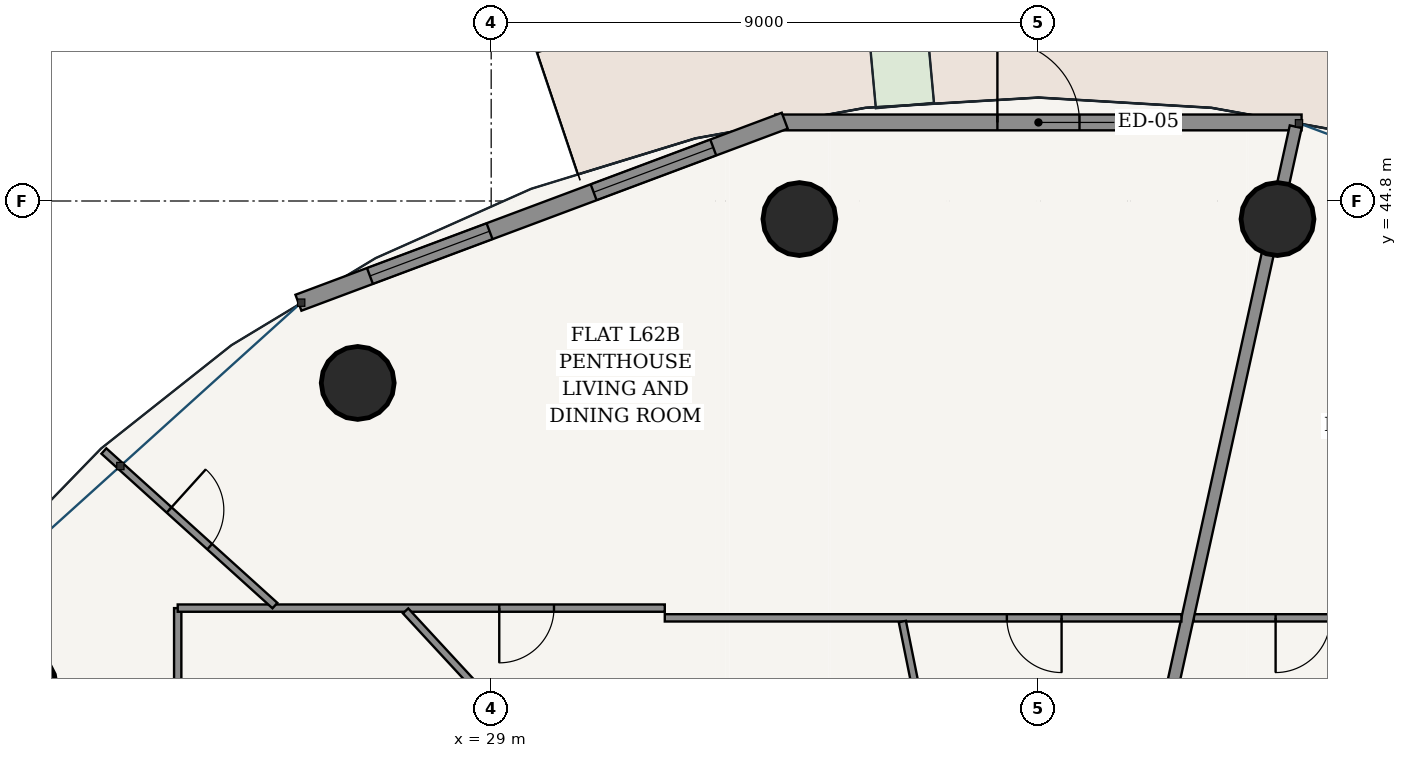
"""IFC4 building model, lengths in metres.
Left out: names, types, materials, properties, quantities, classifications, styles, units other than length and angle.
Written with IfcOpenShell. Run it as: python <this file> out.ifc"""

import sys

from ifc_helpers import new_model, si_unit, direction, frame, frame_2d, origin, origin_2d, place, context, subcontext, project, spatial, rectangle, hollow_circle, extrude, source, transform, mapped, element, fill, save


model = new_model("IFC4")
c1 = context("Model", 3, precision=1e-05, world=origin(), true_north=direction((-0.2419218956, 0.970295726276)))
c2 = subcontext(c1, "Body", "Model", "MODEL_VIEW")
j1 = project(units=[si_unit("LENGTHUNIT", "METRE"), si_unit("PLANEANGLEUNIT", "RADIAN")], contexts=[c1])
p1 = place(None, origin())
s1 = spatial("IfcSite", under=j1, at=p1, CompositionType="ELEMENT")
p2 = place(p1, origin())
s2 = spatial("IfcBuilding", under=s1, at=p2, CompositionType="ELEMENT")
p3 = place(p2, frame((0.0, 0.0, 235.6)))
s3 = spatial("IfcBuildingStorey", under=s2, at=p3, CompositionType="ELEMENT", Elevation=235.6)
for number, where, z_axis, x_axis in (
    (1, (41.931, 44.503, 0.0), (0.0, 0.0, 1.0), (1.0, 0.0, 0.0)),
    (2, (34.069, 44.503, 0.0), (0.0, 0.0, 1.0), (1.0, 0.0, 0.0)),
    (3, (26.805, 41.808, 0.0), (0.0, 0.0, 1.0), (1.0, 0.0, 0.0)),
    (4, (21.246, 36.828, 0.0), (0.0, 0.0, 1.0), (1.0, 0.0, 0.0)),
):
    element("IfcColumn", number, at=place(p3, frame(where, z_axis=z_axis, x_axis=x_axis)), inside=s3, PredefinedType="COLUMN", context=c2, shape_type="SweptSolid", body=[
        extrude(hollow_circle(Radius=0.6, WallThickness=0.038, at=origin_2d()), origin(), (0.0, 0.0, 1.0), 3.7),
    ])
p4 = place(p3, frame((42.327, 46.092, 0.0), z_axis=(0.0, 0.0, 1.0), x_axis=(-1.0, 0.0, 0.0)))
e5 = element("IfcWall", 5, at=p4, inside=s3, PredefinedType="SOLIDWALL", context=c2, shape_type="SweptSolid", body=[
    extrude(rectangle(XDim=8.654, YDim=0.26, at=frame_2d((4.327, 0.0))), origin(), (0.0, 0.0, 1.0), 3.435),
])
p5 = place(p4, frame((3.652, 0.0, 0.0)))
e6 = element("IfcOpeningElement", 6, at=p5, cuts=e5, PredefinedType="OPENING", context=c2, shape_type="SweptSolid", body=[
    extrude(rectangle(XDim=1.35, YDim=2.2, at=frame_2d((0.675, 1.1))), frame((0.0, 0.14, 0.0), z_axis=(0.0, -1.0, 0.0), x_axis=(1.0, 0.0, 0.0)), (0.0, 0.0, 1.0), 0.28),
])
p6 = place(p3, frame((33.828, 46.12, 0.0), z_axis=(0.0, 0.0, 1.0), x_axis=(-0.936556918375, -0.350515532672, 0.0)))
e7 = element("IfcWall", 7, at=p6, inside=s3, PredefinedType="SOLIDWALL", context=c2, shape_type="SweptSolid", body=[
    extrude(rectangle(XDim=8.539, YDim=0.28, at=frame_2d((4.27, 0.0))), origin(), (0.0, 0.0, 1.0), 3.435),
])
p7 = place(p6, frame((1.256, 0.0, 0.85)))
e8 = element("IfcOpeningElement", 8, at=p7, cuts=e7, PredefinedType="OPENING", context=c2, shape_type="SweptSolid", body=[
    extrude(rectangle(XDim=2.1, YDim=1.95, at=frame_2d((1.05, 0.975))), frame((0.0, 0.15, 0.0), z_axis=(0.0, -1.0, 0.0), x_axis=(1.0, 0.0, 0.0)), (0.0, 0.0, 1.0), 0.3),
])
p8 = place(p6, frame((5.184, 0.0, 0.85)))
e9 = element("IfcOpeningElement", 9, at=p8, cuts=e7, PredefinedType="OPENING", context=c2, shape_type="SweptSolid", body=[
    extrude(rectangle(XDim=2.1, YDim=1.95, at=frame_2d((1.05, 0.975))), frame((0.0, 0.15, 0.0), z_axis=(0.0, -1.0, 0.0), x_axis=(1.0, 0.0, 0.0)), (0.0, 0.0, 1.0), 0.3),
])
p9 = place(p3, frame((40.555, 37.945, 0.0), z_axis=(0.0, 0.0, 1.0), x_axis=(1.0, 0.0, 0.0)))
e10 = element("IfcWall", 10, at=p9, inside=s3, PredefinedType="PARTITIONING", context=c2, shape_type="SweptSolid", body=[
    extrude(rectangle(XDim=3.59, YDim=0.12, at=frame_2d((1.795, 0.0))), origin(), (0.0, 0.0, 1.0), 2.951),
])
p10 = place(p9, frame((1.345, 0.0, 0.0)))
e11 = element("IfcOpeningElement", 11, at=p10, cuts=e10, PredefinedType="OPENING", context=c2, shape_type="SweptSolid", body=[
    extrude(rectangle(XDim=0.9, YDim=2.15, at=frame_2d((0.45, 1.075))), frame((0.0, 0.07, 0.0), z_axis=(0.0, -1.0, 0.0), x_axis=(1.0, 0.0, 0.0)), (0.0, 0.0, 1.0), 0.14),
])
p11 = place(p3, frame((39.811, 35.027, 0.0), z_axis=(0.0, 0.0, 1.0), x_axis=(0.214966857327, 0.976621344356, 0.0)))
e12 = element("IfcWall", 12, at=p11, inside=s3, PredefinedType="PARTITIONING", context=c2, shape_type="SweptSolid", body=[
    extrude(rectangle(XDim=11.258, YDim=0.2, at=frame_2d((5.629, 0.0))), origin(), (0.0, 0.0, 1.0), 2.52),
])
p12 = place(p3, frame((23.845, 26.902, 0.0), z_axis=(0.0, 0.0, 1.0), x_axis=(0.0, 1.0, 0.0)))
e13 = element("IfcWall", 13, at=p12, inside=s3, PredefinedType="PARTITIONING", context=c2, shape_type="SweptSolid", body=[
    extrude(rectangle(XDim=11.203, YDim=0.12, at=frame_2d((5.602, 0.0))), origin(), (0.0, 0.0, 1.0), 2.951),
])
p13 = place(p12, frame((2.276, 0.0, 0.0)))
e14 = element("IfcOpeningElement", 14, at=p13, cuts=e13, PredefinedType="OPENING", context=c2, shape_type="SweptSolid", body=[
    extrude(rectangle(XDim=0.9, YDim=2.15, at=frame_2d((0.45, 1.075))), frame((0.0, 0.07, 0.0), z_axis=(0.0, -1.0, 0.0), x_axis=(1.0, 0.0, 0.0)), (0.0, 0.0, 1.0), 0.14),
])
p14 = place(p3, frame((23.845, 38.105, 0.0), z_axis=(0.0, 0.0, 1.0), x_axis=(1.0, 0.0, 0.0)))
e15 = element("IfcWall", 15, at=p14, inside=s3, PredefinedType="PARTITIONING", context=c2, shape_type="SweptSolid", body=[
    extrude(rectangle(XDim=8.01, YDim=0.12, at=frame_2d((4.005, 0.0))), origin(), (0.0, 0.0, 1.0), 2.951),
])
p15 = place(p14, frame((5.288, 0.0, 0.0)))
e16 = element("IfcOpeningElement", 16, at=p15, cuts=e15, PredefinedType="OPENING", context=c2, shape_type="SweptSolid", body=[
    extrude(rectangle(XDim=0.9, YDim=2.15, at=frame_2d((0.45, 1.075))), frame((0.0, 0.07, 0.0), z_axis=(0.0, -1.0, 0.0), x_axis=(1.0, 0.0, 0.0)), (0.0, 0.0, 1.0), 0.14),
])
p16 = place(p3, frame((31.855, 37.945, 0.0), z_axis=(0.0, 0.0, 1.0), x_axis=(1.0, 0.0, 0.0)))
e17 = element("IfcWall", 17, at=p16, inside=s3, PredefinedType="PARTITIONING", context=c2, shape_type="SweptSolid", body=[
    extrude(rectangle(XDim=8.496, YDim=0.12, at=frame_2d((4.248, 0.0))), origin(), (0.0, 0.0, 1.0), 2.951),
])
p17 = place(p16, frame((5.625, 0.0, 0.0)))
e18 = element("IfcOpeningElement", 18, at=p17, cuts=e17, PredefinedType="OPENING", context=c2, shape_type="SweptSolid", body=[
    extrude(rectangle(XDim=0.9, YDim=2.15, at=frame_2d((0.45, 1.075))), frame((0.0, 0.07, 0.0), z_axis=(0.0, -1.0, 0.0), x_axis=(1.0, 0.0, 0.0)), (0.0, 0.0, 1.0), 0.14),
])
p18 = place(p3, frame((25.444, 38.146, 0.0), z_axis=(0.0, 0.0, 1.0), x_axis=(-0.741941434687, 0.670464695189, 0.0)))
e19 = element("IfcWall", 19, at=p18, inside=s3, PredefinedType="PARTITIONING", context=c2, shape_type="SweptSolid", body=[
    extrude(rectangle(XDim=3.792, YDim=0.12, at=frame_2d((1.896, 0.0))), origin(), (0.0, 0.0, 1.0), 2.951),
])
p19 = place(p18, frame((1.446, 0.0, 0.0)))
e20 = element("IfcOpeningElement", 20, at=p19, cuts=e19, PredefinedType="OPENING", context=c2, shape_type="SweptSolid", body=[
    extrude(rectangle(XDim=0.9, YDim=2.15, at=frame_2d((0.45, 1.075))), frame((0.0, 0.07, 0.0), z_axis=(0.0, -1.0, 0.0), x_axis=(1.0, 0.0, 0.0)), (0.0, 0.0, 1.0), 0.14),
])
p20 = place(p3, frame((36.339, 35.027, 0.0), z_axis=(0.0, 0.0, 1.0), x_axis=(-0.197903570547, 0.980221493727, 0.0)))
e21 = element("IfcWall", 21, at=p20, inside=s3, PredefinedType="PARTITIONING", context=c2, shape_type="SweptSolid", body=[
    extrude(rectangle(XDim=2.915, YDim=0.12, at=frame_2d((1.458, 0.0))), origin(), (0.0, 0.0, 1.0), 2.52),
])
p21 = place(p3, frame((30.396, 35.026, 0.0), z_axis=(0.0, 0.0, 1.0), x_axis=(-0.678748871003, 0.73437045836, 0.0)))
e22 = element("IfcWall", 22, at=p21, inside=s3, PredefinedType="PARTITIONING", context=c2, shape_type="SweptSolid", body=[
    extrude(rectangle(XDim=4.13, YDim=0.12, at=frame_2d((2.065, 0.0))), origin(), (0.0, 0.0, 1.0), 2.951),
])
m1 = source(origin(), c2, "Body", "SweptSolid", [
    extrude(rectangle(XDim=1.35, YDim=2.2, at=frame_2d((0.675, 1.1))), frame((0.0, 0.025, 0.0), z_axis=(0.0, -1.0, 0.0), x_axis=(1.0, 0.0, 0.0)), (0.0, 0.0, 1.0), 0.05),
])
p22 = place(p5, frame((1.35, 0.0, 0.0), z_axis=(0.0, 0.0, 1.0), x_axis=(-1.0, 0.0, 0.0)))
e23 = element("IfcDoor", 23, at=p22, inside=s3, OperationType="SINGLE_SWING_LEFT", PredefinedType="DOOR", context=c2, shape_type="MappedRepresentation", body=[
    mapped(m1, transform((0.0, 0.0, 0.0), scale=1.0)),
])
fill(e6, e23)
m2 = source(origin(), c2, "Body", "SweptSolid", [
    extrude(rectangle(XDim=2.1, YDim=1.95, at=frame_2d((1.05, 0.975))), frame((0.0, 0.03, 0.0), z_axis=(0.0, -1.0, 0.0), x_axis=(1.0, 0.0, 0.0)), (0.0, 0.0, 1.0), 0.06),
])
p23 = place(p7, origin())
e24 = element("IfcWindow", 24, at=p23, inside=s3, PartitioningType="SINGLE_PANEL", PredefinedType="WINDOW", context=c2, shape_type="MappedRepresentation", body=[
    mapped(m2, transform((0.0, 0.0, 0.0), scale=1.0)),
])
fill(e8, e24)
p24 = place(p8, origin())
e25 = element("IfcWindow", 25, at=p24, inside=s3, PartitioningType="SINGLE_PANEL", PredefinedType="WINDOW", context=c2, shape_type="MappedRepresentation", body=[
    mapped(m2, transform((0.0, 0.0, 0.0), scale=1.0)),
])
fill(e9, e25)
m3 = source(origin(), c2, "Body", "SweptSolid", [
    extrude(rectangle(XDim=0.9, YDim=2.15, at=frame_2d((0.45, 1.075))), frame((0.0, 0.025, 0.0), z_axis=(0.0, -1.0, 0.0), x_axis=(1.0, 0.0, 0.0)), (0.0, 0.0, 1.0), 0.05),
])
p25 = place(p10, frame((0.9, 0.0, 0.0), z_axis=(0.0, 0.0, 1.0), x_axis=(-1.0, 0.0, 0.0)))
e26 = element("IfcDoor", 26, at=p25, inside=s3, OperationType="SINGLE_SWING_RIGHT", PredefinedType="DOOR", context=c2, shape_type="MappedRepresentation", body=[
    mapped(m3, transform((0.0, 0.0, 0.0), scale=1.0)),
])
fill(e11, e26)
p26 = place(p19, frame((0.9, 0.0, 0.0), z_axis=(0.0, 0.0, 1.0), x_axis=(-1.0, 0.0, 0.0)))
e27 = element("IfcDoor", 27, at=p26, inside=s3, OperationType="SINGLE_SWING_LEFT", PredefinedType="DOOR", context=c2, shape_type="MappedRepresentation", body=[
    mapped(m3, transform((0.0, 0.0, 0.0), scale=1.0)),
])
fill(e20, e27)
p27 = place(p15, frame((0.9, 0.0, 0.0), z_axis=(0.0, 0.0, 1.0), x_axis=(-1.0, 0.0, 0.0)))
e28 = element("IfcDoor", 28, at=p27, inside=s3, OperationType="SINGLE_SWING_RIGHT", PredefinedType="DOOR", context=c2, shape_type="MappedRepresentation", body=[
    mapped(m3, transform((0.0, 0.0, 0.0), scale=1.0)),
])
fill(e16, e28)
p28 = place(p17, frame((0.9, 0.0, 0.0), z_axis=(0.0, 0.0, 1.0), x_axis=(-1.0, 0.0, 0.0)))
e29 = element("IfcDoor", 29, at=p28, inside=s3, OperationType="SINGLE_SWING_LEFT", PredefinedType="DOOR", context=c2, shape_type="MappedRepresentation", body=[
    mapped(m3, transform((0.0, 0.0, 0.0), scale=1.0)),
])
fill(e18, e29)
save(model, sys.argv[1])
